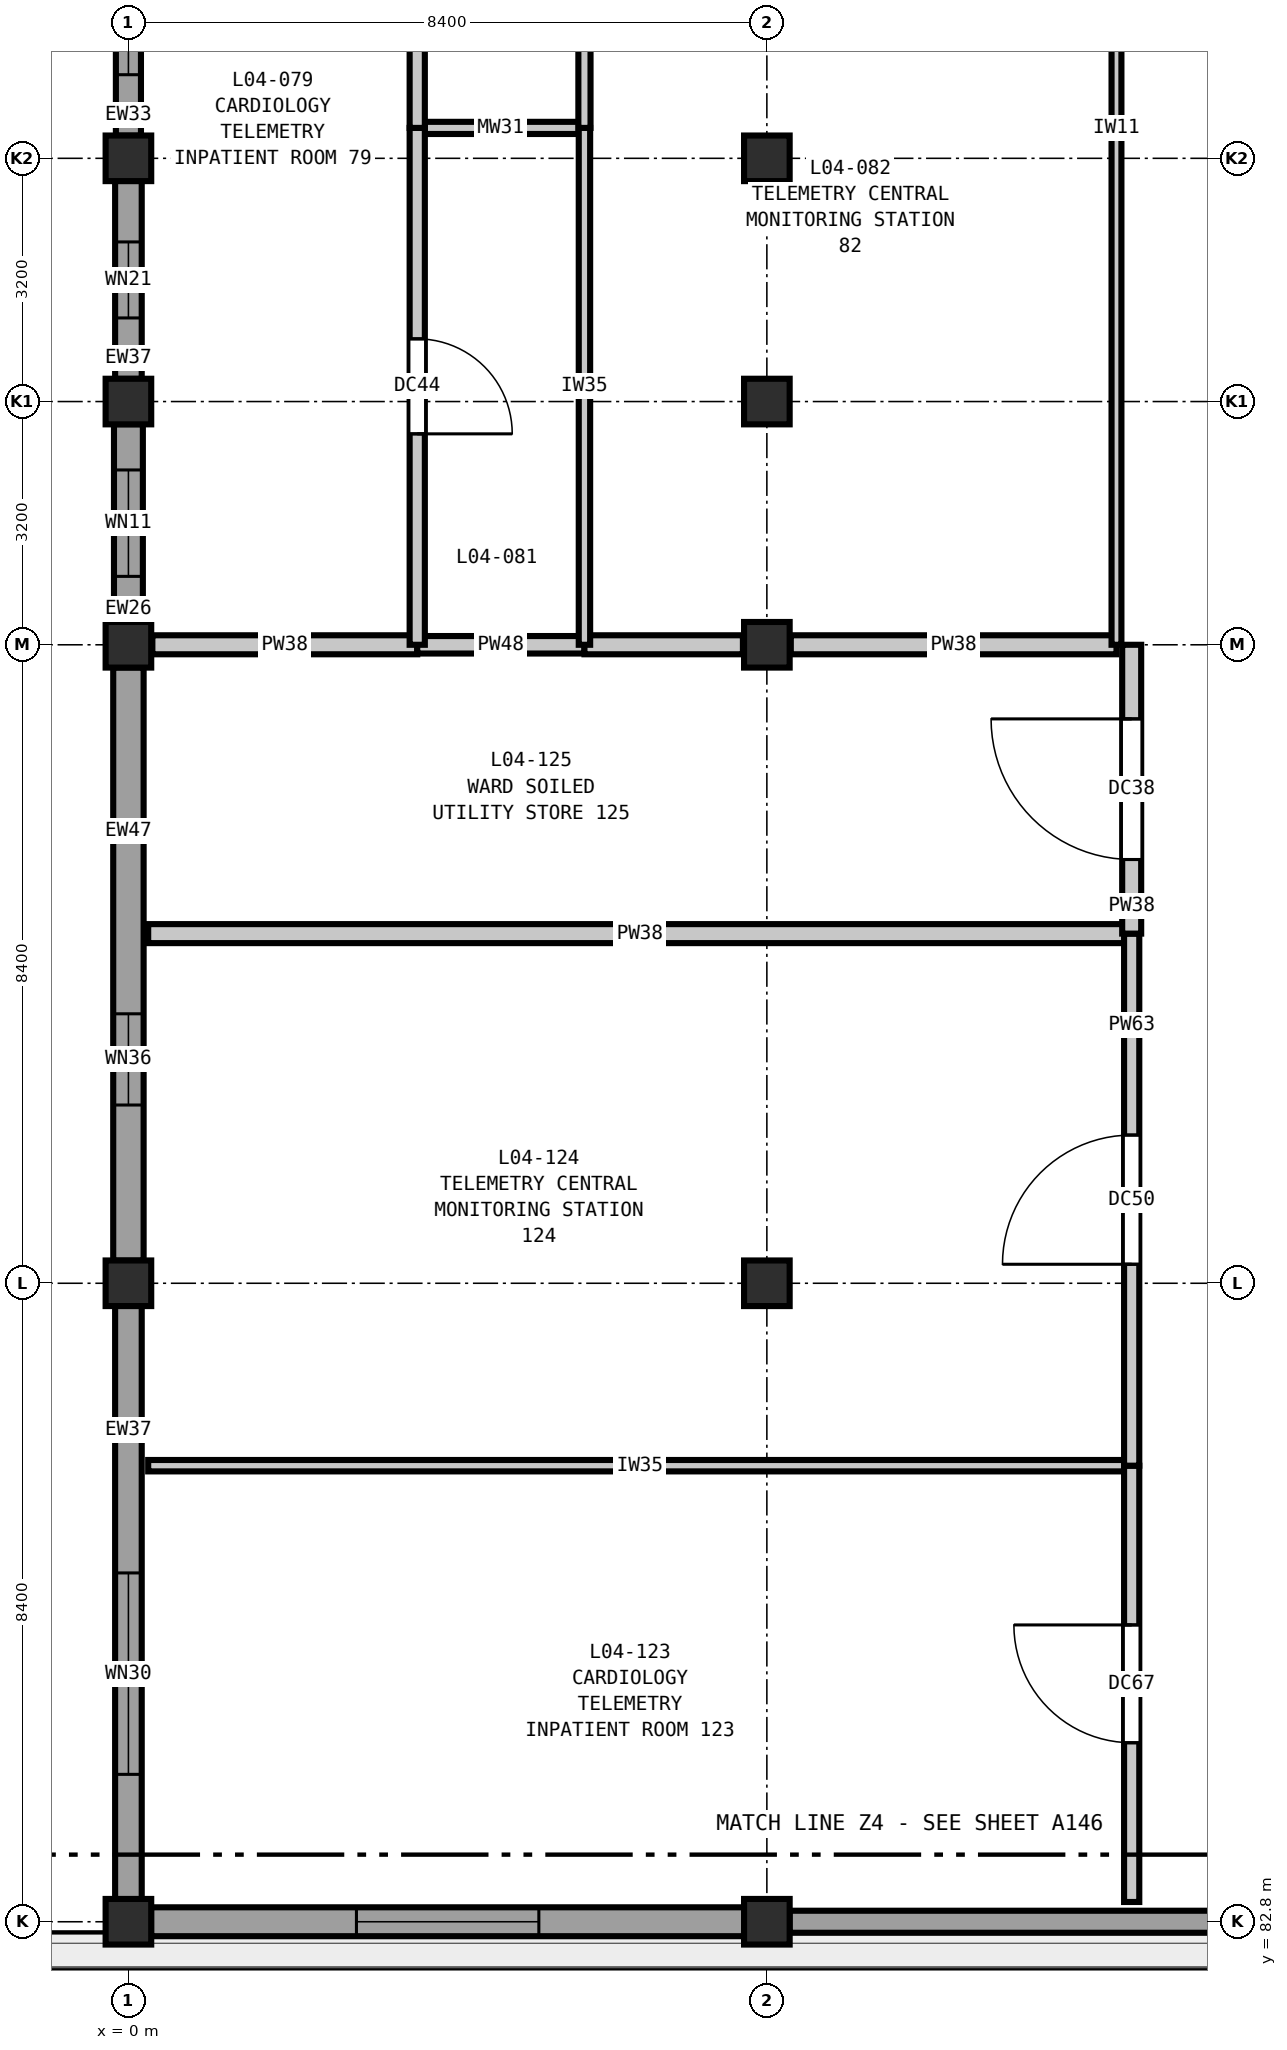
"""IFC4 building model, lengths in metres.
Left out: names, types, materials, properties, quantities, classifications, styles, units other than length and angle.
Written with IfcOpenShell. Run it as: python <this file> out.ifc"""

import sys

from ifc_helpers import new_model, si_unit, direction, frame, frame_2d, origin, origin_2d, place, context, subcontext, project, spatial, rectangle, extrude, element, fill, save


model = new_model("IFC4")
c1 = context("Model", 3, precision=1e-05, world=origin(), true_north=direction((0.0, 1.0)))
c2 = subcontext(c1, "Body", "Model", "MODEL_VIEW")
j1 = project(units=[si_unit("LENGTHUNIT", "METRE"), si_unit("PLANEANGLEUNIT", "RADIAN")], contexts=[c1])
p1 = place(None, origin())
s1 = spatial("IfcSite", under=j1, at=p1, CompositionType="ELEMENT")
p2 = place(p1, origin())
s2 = spatial("IfcBuilding", under=s1, at=p2, CompositionType="ELEMENT")
p3 = place(p2, frame((0.0, 0.0, 20.4)))
s3 = spatial("IfcBuildingStorey", under=s2, at=p3, CompositionType="ELEMENT", Elevation=20.4)
for number, where, z_axis, x_axis in (
    (1, (0.0, 82.8, 0.0), (0.0, 0.0, 1.0), (1.0, 0.0, 0.0)),
    (2, (0.0, 91.2, 0.0), (0.0, 0.0, 1.0), (1.0, 0.0, 0.0)),
    (3, (0.0, 99.6, 0.0), (0.0, 0.0, 1.0), (1.0, 0.0, 0.0)),
    (4, (0.0, 102.8, 0.0), (0.0, 0.0, 1.0), (1.0, 0.0, 0.0)),
    (5, (0.0, 106.0, 0.0), (0.0, 0.0, 1.0), (1.0, 0.0, 0.0)),
    (6, (8.4, 82.8, 0.0), (0.0, 0.0, 1.0), (1.0, 0.0, 0.0)),
    (7, (8.4, 91.2, 0.0), (0.0, 0.0, 1.0), (1.0, 0.0, 0.0)),
    (8, (8.4, 99.6, 0.0), (0.0, 0.0, 1.0), (1.0, 0.0, 0.0)),
    (9, (8.4, 102.8, 0.0), (0.0, 0.0, 1.0), (1.0, 0.0, 0.0)),
    (10, (8.4, 106.0, 0.0), (0.0, 0.0, 1.0), (1.0, 0.0, 0.0)),
):
    element("IfcColumn", number, at=place(p3, frame(where, z_axis=z_axis, x_axis=x_axis)), inside=s3, PredefinedType="COLUMN", context=c2, shape_type="SweptSolid", body=[
        extrude(rectangle(XDim=0.6, YDim=0.6, at=origin_2d()), origin(), (0.0, 0.0, 1.0), 4.2),
    ])
p4 = place(p3, frame((16.502, 82.8, 0.0), z_axis=(0.0, 0.0, 1.0), x_axis=(-1.0, 0.0, 0.0)))
e11 = element("IfcWall", 11, at=p4, inside=s3, PredefinedType="SOLIDWALL", context=c2, shape_type="SweptSolid", body=[
    extrude(rectangle(XDim=7.804, YDim=0.29, at=frame_2d((3.902, 0.0))), origin(), (0.0, 0.0, 1.0), 3.48),
])
p5 = place(p3, frame((8.102, 82.8, 0.0), z_axis=(0.0, 0.0, 1.0), x_axis=(-1.0, 0.0, 0.0)))
e12 = element("IfcWall", 12, at=p5, inside=s3, PredefinedType="SOLIDWALL", context=c2, shape_type="SweptSolid", body=[
    extrude(rectangle(XDim=7.804, YDim=0.38, at=frame_2d((3.902, 0.0))), origin(), (0.0, 0.0, 1.0), 3.48),
])
p6 = place(p5, frame((2.702, 0.0, 0.9)))
e13 = element("IfcOpeningElement", 13, at=p6, cuts=e12, PredefinedType="OPENING", context=c2, shape_type="SweptSolid", body=[
    extrude(rectangle(XDim=2.4, YDim=1.95, at=frame_2d((1.2, 0.975))), frame((0.0, 0.2, 0.0), z_axis=(0.0, -1.0, 0.0), x_axis=(1.0, 0.0, 0.0)), (0.0, 0.0, 1.0), 0.4),
])
p7 = place(p3, frame((0.0, 83.098, 0.0), z_axis=(0.0, 0.0, 1.0), x_axis=(0.0, 1.0, 0.0)))
e14 = element("IfcWall", 14, at=p7, inside=s3, PredefinedType="SOLIDWALL", context=c2, shape_type="SweptSolid", body=[
    extrude(rectangle(XDim=7.804, YDim=0.35, at=frame_2d((3.902, 0.0))), origin(), (0.0, 0.0, 1.0), 3.48),
])
p8 = place(p7, frame((1.641, 0.0, 0.9)))
e15 = element("IfcOpeningElement", 15, at=p8, cuts=e14, PredefinedType="OPENING", context=c2, shape_type="SweptSolid", body=[
    extrude(rectangle(XDim=2.65, YDim=1.95, at=frame_2d((1.325, 0.975))), frame((0.0, 0.185, 0.0), z_axis=(0.0, -1.0, 0.0), x_axis=(1.0, 0.0, 0.0)), (0.0, 0.0, 1.0), 0.37),
])
p9 = place(p3, frame((0.0, 91.498, 0.0), z_axis=(0.0, 0.0, 1.0), x_axis=(0.0, 1.0, 0.0)))
e16 = element("IfcWall", 16, at=p9, inside=s3, PredefinedType="SOLIDWALL", context=c2, shape_type="SweptSolid", body=[
    extrude(rectangle(XDim=7.804, YDim=0.4, at=frame_2d((3.902, 0.0))), origin(), (0.0, 0.0, 1.0), 3.48),
])
p10 = place(p9, frame((2.047, 0.0, 0.9)))
e17 = element("IfcOpeningElement", 17, at=p10, cuts=e16, PredefinedType="OPENING", context=c2, shape_type="SweptSolid", body=[
    extrude(rectangle(XDim=1.2, YDim=2.15, at=frame_2d((0.6, 1.075))), frame((0.0, 0.21, 0.0), z_axis=(0.0, -1.0, 0.0), x_axis=(1.0, 0.0, 0.0)), (0.0, 0.0, 1.0), 0.42),
])
p11 = place(p3, frame((0.0, 99.898, 0.0), z_axis=(0.0, 0.0, 1.0), x_axis=(0.0, 1.0, 0.0)))
e18 = element("IfcWall", 18, at=p11, inside=s3, PredefinedType="SOLIDWALL", context=c2, shape_type="SweptSolid", body=[
    extrude(rectangle(XDim=2.604, YDim=0.38, at=frame_2d((1.302, 0.0))), origin(), (0.0, 0.0, 1.0), 3.48),
])
p12 = place(p11, frame((0.602, 0.0, 0.9)))
e19 = element("IfcOpeningElement", 19, at=p12, cuts=e18, PredefinedType="OPENING", context=c2, shape_type="SweptSolid", body=[
    extrude(rectangle(XDim=1.4, YDim=2.15, at=frame_2d((0.7, 1.075))), frame((0.0, 0.2, 0.0), z_axis=(0.0, -1.0, 0.0), x_axis=(1.0, 0.0, 0.0)), (0.0, 0.0, 1.0), 0.4),
])
p13 = place(p3, frame((0.0, 103.098, 0.0), z_axis=(0.0, 0.0, 1.0), x_axis=(0.0, 1.0, 0.0)))
e20 = element("IfcWall", 20, at=p13, inside=s3, PredefinedType="SOLIDWALL", context=c2, shape_type="SweptSolid", body=[
    extrude(rectangle(XDim=2.604, YDim=0.35, at=frame_2d((1.302, 0.0))), origin(), (0.0, 0.0, 1.0), 3.48),
])
p14 = place(p13, frame((0.802, 0.0, 0.9)))
e21 = element("IfcOpeningElement", 21, at=p14, cuts=e20, PredefinedType="OPENING", context=c2, shape_type="SweptSolid", body=[
    extrude(rectangle(XDim=1.0, YDim=1.55, at=frame_2d((0.5, 0.775))), frame((0.0, 0.185, 0.0), z_axis=(0.0, -1.0, 0.0), x_axis=(1.0, 0.0, 0.0)), (0.0, 0.0, 1.0), 0.37),
])
p15 = place(p3, frame((0.0, 106.298, 0.0), z_axis=(0.0, 0.0, 1.0), x_axis=(0.0, 1.0, 0.0)))
e22 = element("IfcWall", 22, at=p15, inside=s3, PredefinedType="SOLIDWALL", context=c2, shape_type="SweptSolid", body=[
    extrude(rectangle(XDim=2.604, YDim=0.33, at=frame_2d((1.302, 0.0))), origin(), (0.0, 0.0, 1.0), 3.48),
])
p16 = place(p15, frame((0.802, 0.0, 0.9)))
e23 = element("IfcOpeningElement", 23, at=p16, cuts=e22, PredefinedType="OPENING", context=c2, shape_type="SweptSolid", body=[
    extrude(rectangle(XDim=1.0, YDim=1.55, at=frame_2d((0.5, 0.775))), frame((0.0, 0.175, 0.0), z_axis=(0.0, -1.0, 0.0), x_axis=(1.0, 0.0, 0.0)), (0.0, 0.0, 1.0), 0.35),
])
p17 = place(p3, frame((0.26, 88.8, 0.0), z_axis=(0.0, 0.0, 1.0), x_axis=(1.0, 0.0, 0.0)))
e24 = element("IfcWall", 24, at=p17, inside=s3, PredefinedType="PARTITIONING", context=c2, shape_type="SweptSolid", body=[
    extrude(rectangle(XDim=12.94, YDim=0.15, at=frame_2d((6.47, 0.0))), origin(), (0.0, 0.0, 1.0), 3.82),
])
p18 = place(p3, frame((0.26, 95.8, 0.0), z_axis=(0.0, 0.0, 1.0), x_axis=(1.0, 0.0, 0.0)))
e25 = element("IfcWall", 25, at=p18, inside=s3, PredefinedType="PARTITIONING", context=c2, shape_type="SweptSolid", body=[
    extrude(rectangle(XDim=12.94, YDim=0.25, at=frame_2d((6.47, 0.0))), origin(), (0.0, 0.0, 1.0), 3.82),
])
p19 = place(p3, frame((0.315, 99.6, 0.0), z_axis=(0.0, 0.0, 1.0), x_axis=(1.0, 0.0, 0.0)))
e26 = element("IfcWall", 26, at=p19, inside=s3, PredefinedType="PARTITIONING", context=c2, shape_type="SweptSolid", body=[
    extrude(rectangle(XDim=3.485, YDim=0.25, at=frame_2d((1.743, 0.0))), origin(), (0.0, 0.0, 1.0), 3.585),
])
p20 = place(p3, frame((3.8, 99.6, 0.0), z_axis=(0.0, 0.0, 1.0), x_axis=(1.0, 0.0, 0.0)))
e27 = element("IfcWall", 27, at=p20, inside=s3, PredefinedType="PARTITIONING", context=c2, shape_type="SweptSolid", body=[
    extrude(rectangle(XDim=2.2, YDim=0.23, at=frame_2d((1.1, 0.0))), origin(), (0.0, 0.0, 1.0), 3.585),
])
p21 = place(p3, frame((8.715, 99.6, 0.0), z_axis=(0.0, 0.0, 1.0), x_axis=(1.0, 0.0, 0.0)))
e28 = element("IfcWall", 28, at=p21, inside=s3, PredefinedType="PARTITIONING", context=c2, shape_type="SweptSolid", body=[
    extrude(rectangle(XDim=4.285, YDim=0.25, at=frame_2d((2.143, 0.0))), origin(), (0.0, 0.0, 1.0), 3.585),
])
p22 = place(p3, frame((6.0, 99.6, 0.0), z_axis=(0.0, 0.0, 1.0), x_axis=(1.0, 0.0, 0.0)))
e29 = element("IfcWall", 29, at=p22, inside=s3, PredefinedType="PARTITIONING", context=c2, shape_type="SweptSolid", body=[
    extrude(rectangle(XDim=2.085, YDim=0.25, at=frame_2d((1.042, 0.0))), origin(), (0.0, 0.0, 1.0), 3.585),
])
p23 = place(p3, frame((3.8, 106.4, 0.0), z_axis=(0.0, 0.0, 1.0), x_axis=(1.0, 0.0, 0.0)))
e30 = element("IfcWall", 30, at=p23, inside=s3, PredefinedType="PLUMBINGWALL", context=c2, shape_type="SweptSolid", body=[
    extrude(rectangle(XDim=2.2, YDim=0.16, at=frame_2d((1.1, 0.0))), origin(), (0.0, 0.0, 1.0), 3.82),
])
p24 = place(p3, frame((3.8, 99.6, 0.0), z_axis=(0.0, 0.0, 1.0), x_axis=(0.0, 1.0, 0.0)))
e31 = element("IfcWall", 31, at=p24, inside=s3, PredefinedType="PARTITIONING", context=c2, shape_type="SweptSolid", body=[
    extrude(rectangle(XDim=6.8, YDim=0.2, at=frame_2d((3.4, 0.0))), origin(), (0.0, 0.0, 1.0), 3.82),
])
p25 = place(p24, frame((2.775, 0.0, 0.0)))
e32 = element("IfcOpeningElement", 32, at=p25, cuts=e31, PredefinedType="OPENING", context=c2, shape_type="SweptSolid", body=[
    extrude(rectangle(XDim=1.25, YDim=2.15, at=frame_2d((0.625, 1.075))), frame((0.0, 0.11, 0.0), z_axis=(0.0, -1.0, 0.0), x_axis=(1.0, 0.0, 0.0)), (0.0, 0.0, 1.0), 0.22),
])
p26 = place(p3, frame((3.8, 106.4, 0.0), z_axis=(0.0, 0.0, 1.0), x_axis=(0.0, 1.0, 0.0)))
e33 = element("IfcWall", 33, at=p26, inside=s3, PredefinedType="PARTITIONING", context=c2, shape_type="SweptSolid", body=[
    extrude(rectangle(XDim=6.8, YDim=0.2, at=frame_2d((3.4, 0.0))), origin(), (0.0, 0.0, 1.0), 3.82),
])
p27 = place(p26, frame((2.94, 0.0, 0.0)))
e34 = element("IfcOpeningElement", 34, at=p27, cuts=e33, PredefinedType="OPENING", context=c2, shape_type="SweptSolid", body=[
    extrude(rectangle(XDim=0.92, YDim=2.1, at=frame_2d((0.46, 1.05))), frame((0.0, 0.11, 0.0), z_axis=(0.0, -1.0, 0.0), x_axis=(1.0, 0.0, 0.0)), (0.0, 0.0, 1.0), 0.22),
])
p28 = place(p3, frame((6.0, 99.6, 0.0), z_axis=(0.0, 0.0, 1.0), x_axis=(0.0, 1.0, 0.0)))
e35 = element("IfcWall", 35, at=p28, inside=s3, PredefinedType="PARTITIONING", context=c2, shape_type="SweptSolid", body=[
    extrude(rectangle(XDim=6.8, YDim=0.15, at=frame_2d((3.4, 0.0))), origin(), (0.0, 0.0, 1.0), 3.82),
])
p29 = place(p3, frame((6.0, 106.4, 0.0), z_axis=(0.0, 0.0, 1.0), x_axis=(0.0, 1.0, 0.0)))
e36 = element("IfcWall", 36, at=p29, inside=s3, PredefinedType="PLUMBINGWALL", context=c2, shape_type="SweptSolid", body=[
    extrude(rectangle(XDim=6.8, YDim=0.16, at=frame_2d((3.4, 0.0))), origin(), (0.0, 0.0, 1.0), 3.82),
])
p30 = place(p3, frame((13.0, 99.6, 0.0), z_axis=(0.0, 0.0, 1.0), x_axis=(0.0, 1.0, 0.0)))
e37 = element("IfcWall", 37, at=p30, inside=s3, PredefinedType="PARTITIONING", context=c2, shape_type="SweptSolid", body=[
    extrude(rectangle(XDim=13.6, YDim=0.13, at=frame_2d((6.8, 0.0))), origin(), (0.0, 0.0, 1.0), 3.82),
])
p31 = place(p3, frame((13.2, 83.06, 0.0), z_axis=(0.0, 0.0, 1.0), x_axis=(0.0, 1.0, 0.0)))
e38 = element("IfcWall", 38, at=p31, inside=s3, PredefinedType="PARTITIONING", context=c2, shape_type="SweptSolid", body=[
    extrude(rectangle(XDim=5.74, YDim=0.2, at=frame_2d((2.87, 0.0))), origin(), (0.0, 0.0, 1.0), 3.82),
])
p32 = place(p31, frame((2.095, 0.0, 0.0)))
e39 = element("IfcOpeningElement", 39, at=p32, cuts=e38, PredefinedType="OPENING", context=c2, shape_type="SweptSolid", body=[
    extrude(rectangle(XDim=1.55, YDim=2.25, at=frame_2d((0.775, 1.125))), frame((0.0, 0.11, 0.0), z_axis=(0.0, -1.0, 0.0), x_axis=(1.0, 0.0, 0.0)), (0.0, 0.0, 1.0), 0.22),
])
p33 = place(p3, frame((13.2, 88.8, 0.0), z_axis=(0.0, 0.0, 1.0), x_axis=(0.0, 1.0, 0.0)))
e40 = element("IfcWall", 40, at=p33, inside=s3, PredefinedType="PARTITIONING", context=c2, shape_type="SweptSolid", body=[
    extrude(rectangle(XDim=7.0, YDim=0.2, at=frame_2d((3.5, 0.0))), origin(), (0.0, 0.0, 1.0), 3.82),
])
p34 = place(p33, frame((2.65, 0.0, 0.0)))
e41 = element("IfcOpeningElement", 41, at=p34, cuts=e40, PredefinedType="OPENING", context=c2, shape_type="SweptSolid", body=[
    extrude(rectangle(XDim=1.7, YDim=2.3, at=frame_2d((0.85, 1.15))), frame((0.0, 0.11, 0.0), z_axis=(0.0, -1.0, 0.0), x_axis=(1.0, 0.0, 0.0)), (0.0, 0.0, 1.0), 0.22),
])
p35 = place(p3, frame((13.2, 95.8, 0.0), z_axis=(0.0, 0.0, 1.0), x_axis=(0.0, 1.0, 0.0)))
e42 = element("IfcWall", 42, at=p35, inside=s3, PredefinedType="PARTITIONING", context=c2, shape_type="SweptSolid", body=[
    extrude(rectangle(XDim=3.8, YDim=0.25, at=frame_2d((1.9, 0.0))), origin(), (0.0, 0.0, 1.0), 3.82),
])
p36 = place(p35, frame((0.975, 0.0, 0.0)))
e43 = element("IfcOpeningElement", 43, at=p36, cuts=e42, PredefinedType="OPENING", context=c2, shape_type="SweptSolid", body=[
    extrude(rectangle(XDim=1.85, YDim=2.3, at=frame_2d((0.925, 1.15))), frame((0.0, 0.135, 0.0), z_axis=(0.0, -1.0, 0.0), x_axis=(1.0, 0.0, 0.0)), (0.0, 0.0, 1.0), 0.27),
])
p37 = place(p6, origin())
e44 = element("IfcWindow", 44, at=p37, inside=s3, PartitioningType="DOUBLE_PANEL_VERTICAL", PredefinedType="WINDOW", context=c2, shape_type="SweptSolid", body=[
    extrude(rectangle(XDim=2.4, YDim=1.95, at=frame_2d((1.2, 0.975))), frame((0.0, 0.03, 0.0), z_axis=(0.0, -1.0, 0.0), x_axis=(1.0, 0.0, 0.0)), (0.0, 0.0, 1.0), 0.06),
])
fill(e13, e44)
p38 = place(p8, origin())
e45 = element("IfcWindow", 45, at=p38, inside=s3, PartitioningType="DOUBLE_PANEL_VERTICAL", PredefinedType="WINDOW", context=c2, shape_type="SweptSolid", body=[
    extrude(rectangle(XDim=2.65, YDim=1.95, at=frame_2d((1.325, 0.975))), frame((0.0, 0.03, 0.0), z_axis=(0.0, -1.0, 0.0), x_axis=(1.0, 0.0, 0.0)), (0.0, 0.0, 1.0), 0.06),
])
fill(e15, e45)
p39 = place(p10, origin())
e46 = element("IfcWindow", 46, at=p39, inside=s3, PartitioningType="SINGLE_PANEL", PredefinedType="WINDOW", context=c2, shape_type="SweptSolid", body=[
    extrude(rectangle(XDim=1.2, YDim=2.15, at=frame_2d((0.6, 1.075))), frame((0.0, 0.03, 0.0), z_axis=(0.0, -1.0, 0.0), x_axis=(1.0, 0.0, 0.0)), (0.0, 0.0, 1.0), 0.06),
])
fill(e17, e46)
p40 = place(p12, origin())
e47 = element("IfcWindow", 47, at=p40, inside=s3, PartitioningType="SINGLE_PANEL", PredefinedType="WINDOW", context=c2, shape_type="SweptSolid", body=[
    extrude(rectangle(XDim=1.4, YDim=2.15, at=frame_2d((0.7, 1.075))), frame((0.0, 0.03, 0.0), z_axis=(0.0, -1.0, 0.0), x_axis=(1.0, 0.0, 0.0)), (0.0, 0.0, 1.0), 0.06),
])
fill(e19, e47)
p41 = place(p14, origin())
e48 = element("IfcWindow", 48, at=p41, inside=s3, PartitioningType="SINGLE_PANEL", PredefinedType="WINDOW", context=c2, shape_type="SweptSolid", body=[
    extrude(rectangle(XDim=1.0, YDim=1.55, at=frame_2d((0.5, 0.775))), frame((0.0, 0.03, 0.0), z_axis=(0.0, -1.0, 0.0), x_axis=(1.0, 0.0, 0.0)), (0.0, 0.0, 1.0), 0.06),
])
fill(e21, e48)
p42 = place(p16, origin())
e49 = element("IfcWindow", 49, at=p42, inside=s3, PartitioningType="SINGLE_PANEL", PredefinedType="WINDOW", context=c2, shape_type="SweptSolid", body=[
    extrude(rectangle(XDim=1.0, YDim=1.55, at=frame_2d((0.5, 0.775))), frame((0.0, 0.03, 0.0), z_axis=(0.0, -1.0, 0.0), x_axis=(1.0, 0.0, 0.0)), (0.0, 0.0, 1.0), 0.06),
])
fill(e23, e49)
p43 = place(p25, frame((1.25, 0.0, 0.0), z_axis=(0.0, 0.0, 1.0), x_axis=(-1.0, 0.0, 0.0)))
e50 = element("IfcDoor", 50, at=p43, inside=s3, OperationType="SINGLE_SWING_RIGHT", PredefinedType="DOOR", context=c2, shape_type="SweptSolid", body=[
    extrude(rectangle(XDim=1.25, YDim=2.15, at=frame_2d((0.625, 1.075))), frame((0.0, 0.025, 0.0), z_axis=(0.0, -1.0, 0.0), x_axis=(1.0, 0.0, 0.0)), (0.0, 0.0, 1.0), 0.05),
])
fill(e32, e50)
p44 = place(p32, origin())
e51 = element("IfcDoor", 51, at=p44, inside=s3, OperationType="SINGLE_SWING_RIGHT", PredefinedType="DOOR", context=c2, shape_type="SweptSolid", body=[
    extrude(rectangle(XDim=1.55, YDim=2.25, at=frame_2d((0.775, 1.125))), frame((0.0, 0.025, 0.0), z_axis=(0.0, -1.0, 0.0), x_axis=(1.0, 0.0, 0.0)), (0.0, 0.0, 1.0), 0.05),
])
fill(e39, e51)
p45 = place(p34, origin())
e52 = element("IfcDoor", 52, at=p45, inside=s3, OperationType="SINGLE_SWING_LEFT", PredefinedType="DOOR", context=c2, shape_type="SweptSolid", body=[
    extrude(rectangle(XDim=1.7, YDim=2.3, at=frame_2d((0.85, 1.15))), frame((0.0, 0.025, 0.0), z_axis=(0.0, -1.0, 0.0), x_axis=(1.0, 0.0, 0.0)), (0.0, 0.0, 1.0), 0.05),
])
fill(e41, e52)
p46 = place(p36, origin())
e53 = element("IfcDoor", 53, at=p46, inside=s3, OperationType="SINGLE_SWING_RIGHT", PredefinedType="DOOR", context=c2, shape_type="SweptSolid", body=[
    extrude(rectangle(XDim=1.85, YDim=2.3, at=frame_2d((0.925, 1.15))), frame((0.0, 0.025, 0.0), z_axis=(0.0, -1.0, 0.0), x_axis=(1.0, 0.0, 0.0)), (0.0, 0.0, 1.0), 0.05),
])
fill(e43, e53)
save(model, sys.argv[1])
